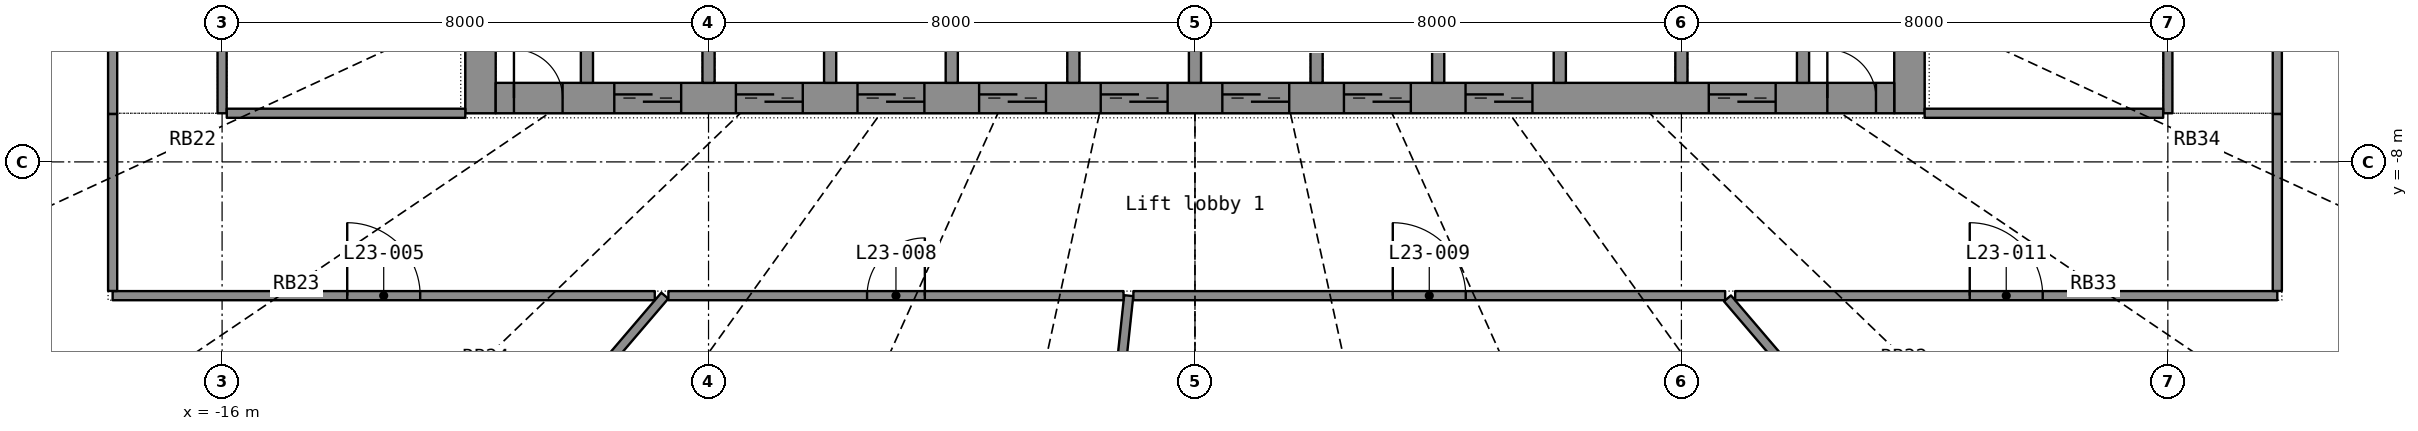
"""IFC4 building model, lengths in metres.
Left out: names, types, materials, properties, quantities, classifications, styles, units other than length and angle.
Written with IfcOpenShell. Run it as: python <this file> out.ifc"""

import sys

from ifc_helpers import new_model, si_unit, direction, frame, frame_2d, origin, place, context, subcontext, project, spatial, rectangle, extrude, element, fill, save


model = new_model("IFC4")
c1 = context("Model", 3, precision=1e-05, world=origin(), true_north=direction((0.0, 1.0)))
c2 = subcontext(c1, "Body", "Model", "MODEL_VIEW")
j1 = project(units=[si_unit("LENGTHUNIT", "METRE"), si_unit("PLANEANGLEUNIT", "RADIAN")], contexts=[c1])
p1 = place(None, origin())
s1 = spatial("IfcSite", under=j1, at=p1, CompositionType="ELEMENT")
p2 = place(p1, origin())
s2 = spatial("IfcBuilding", under=s1, at=p2, CompositionType="ELEMENT")
p3 = place(p2, frame((0.0, 0.0, 100.8)))
s3 = spatial("IfcBuildingStorey", under=s2, at=p3, CompositionType="ELEMENT", Elevation=100.8)
p4 = place(p3, frame((-11.75, -7.2, 0.0), z_axis=(0.0, 0.0, 1.0), x_axis=(0.0, 1.0, 0.0)))
e1 = element("IfcWall", 1, at=p4, inside=s3, PredefinedType="SHEAR", context=c2, shape_type="SweptSolid", body=[
    extrude(rectangle(XDim=14.4, YDim=0.5, at=frame_2d((7.2, 0.0))), origin(), (0.0, 0.0, 1.0), 3.3),
])
p5 = place(p4, frame((6.5, 0.0, 0.0)))
e2 = element("IfcOpeningElement", 2, at=p5, cuts=e1, PredefinedType="OPENING", context=c2, shape_type="SweptSolid", body=[
    extrude(rectangle(XDim=1.4, YDim=2.2, at=frame_2d((0.7, 1.1))), frame((0.0, 0.26, 0.0), z_axis=(0.0, -1.0, 0.0), x_axis=(1.0, 0.0, 0.0)), (0.0, 0.0, 1.0), 0.52),
])
p6 = place(p3, frame((11.75, -7.2, 0.0), z_axis=(0.0, 0.0, 1.0), x_axis=(0.0, 1.0, 0.0)))
e3 = element("IfcWall", 3, at=p6, inside=s3, PredefinedType="SHEAR", context=c2, shape_type="SweptSolid", body=[
    extrude(rectangle(XDim=14.4, YDim=0.5, at=frame_2d((7.2, 0.0))), origin(), (0.0, 0.0, 1.0), 3.3),
])
p7 = place(p6, frame((6.5, 0.0, 0.0)))
e4 = element("IfcOpeningElement", 4, at=p7, cuts=e3, PredefinedType="OPENING", context=c2, shape_type="SweptSolid", body=[
    extrude(rectangle(XDim=1.4, YDim=2.2, at=frame_2d((0.7, 1.1))), frame((0.0, 0.26, 0.0), z_axis=(0.0, -1.0, 0.0), x_axis=(1.0, 0.0, 0.0)), (0.0, 0.0, 1.0), 0.52),
])
p8 = place(p3, frame((-11.5, -6.95, 0.0), z_axis=(0.0, 0.0, 1.0), x_axis=(1.0, 0.0, 0.0)))
e5 = element("IfcWall", 5, at=p8, inside=s3, PredefinedType="SHEAR", context=c2, shape_type="SweptSolid", body=[
    extrude(rectangle(XDim=23.0, YDim=0.5, at=frame_2d((11.5, 0.0))), origin(), (0.0, 0.0, 1.0), 3.3),
])
p9 = place(p8, frame((1.95, 0.0, 0.0)))
e6 = element("IfcOpeningElement", 6, at=p9, cuts=e5, PredefinedType="OPENING", context=c2, shape_type="SweptSolid", body=[
    extrude(rectangle(XDim=1.1, YDim=2.2, at=frame_2d((0.55, 1.1))), frame((0.0, 0.26, 0.0), z_axis=(0.0, -1.0, 0.0), x_axis=(1.0, 0.0, 0.0)), (0.0, 0.0, 1.0), 0.52),
])
p10 = place(p8, frame((3.95, 0.0, 0.0)))
e7 = element("IfcOpeningElement", 7, at=p10, cuts=e5, PredefinedType="OPENING", context=c2, shape_type="SweptSolid", body=[
    extrude(rectangle(XDim=1.1, YDim=2.2, at=frame_2d((0.55, 1.1))), frame((0.0, 0.26, 0.0), z_axis=(0.0, -1.0, 0.0), x_axis=(1.0, 0.0, 0.0)), (0.0, 0.0, 1.0), 0.52),
])
p11 = place(p8, frame((5.95, 0.0, 0.0)))
e8 = element("IfcOpeningElement", 8, at=p11, cuts=e5, PredefinedType="OPENING", context=c2, shape_type="SweptSolid", body=[
    extrude(rectangle(XDim=1.1, YDim=2.2, at=frame_2d((0.55, 1.1))), frame((0.0, 0.26, 0.0), z_axis=(0.0, -1.0, 0.0), x_axis=(1.0, 0.0, 0.0)), (0.0, 0.0, 1.0), 0.52),
])
p12 = place(p8, frame((7.95, 0.0, 0.0)))
e9 = element("IfcOpeningElement", 9, at=p12, cuts=e5, PredefinedType="OPENING", context=c2, shape_type="SweptSolid", body=[
    extrude(rectangle(XDim=1.1, YDim=2.2, at=frame_2d((0.55, 1.1))), frame((0.0, 0.26, 0.0), z_axis=(0.0, -1.0, 0.0), x_axis=(1.0, 0.0, 0.0)), (0.0, 0.0, 1.0), 0.52),
])
p13 = place(p8, frame((9.95, 0.0, 0.0)))
e10 = element("IfcOpeningElement", 10, at=p13, cuts=e5, PredefinedType="OPENING", context=c2, shape_type="SweptSolid", body=[
    extrude(rectangle(XDim=1.1, YDim=2.2, at=frame_2d((0.55, 1.1))), frame((0.0, 0.26, 0.0), z_axis=(0.0, -1.0, 0.0), x_axis=(1.0, 0.0, 0.0)), (0.0, 0.0, 1.0), 0.52),
])
p14 = place(p8, frame((11.95, 0.0, 0.0)))
e11 = element("IfcOpeningElement", 11, at=p14, cuts=e5, PredefinedType="OPENING", context=c2, shape_type="SweptSolid", body=[
    extrude(rectangle(XDim=1.1, YDim=2.2, at=frame_2d((0.55, 1.1))), frame((0.0, 0.26, 0.0), z_axis=(0.0, -1.0, 0.0), x_axis=(1.0, 0.0, 0.0)), (0.0, 0.0, 1.0), 0.52),
])
p15 = place(p8, frame((13.95, 0.0, 0.0)))
e12 = element("IfcOpeningElement", 12, at=p15, cuts=e5, PredefinedType="OPENING", context=c2, shape_type="SweptSolid", body=[
    extrude(rectangle(XDim=1.1, YDim=2.2, at=frame_2d((0.55, 1.1))), frame((0.0, 0.26, 0.0), z_axis=(0.0, -1.0, 0.0), x_axis=(1.0, 0.0, 0.0)), (0.0, 0.0, 1.0), 0.52),
])
p16 = place(p8, frame((15.95, 0.0, 0.0)))
e13 = element("IfcOpeningElement", 13, at=p16, cuts=e5, PredefinedType="OPENING", context=c2, shape_type="SweptSolid", body=[
    extrude(rectangle(XDim=1.1, YDim=2.2, at=frame_2d((0.55, 1.1))), frame((0.0, 0.26, 0.0), z_axis=(0.0, -1.0, 0.0), x_axis=(1.0, 0.0, 0.0)), (0.0, 0.0, 1.0), 0.52),
])
p17 = place(p8, frame((19.95, 0.0, 0.0)))
e14 = element("IfcOpeningElement", 14, at=p17, cuts=e5, PredefinedType="OPENING", context=c2, shape_type="SweptSolid", body=[
    extrude(rectangle(XDim=1.1, YDim=2.2, at=frame_2d((0.55, 1.1))), frame((0.0, 0.26, 0.0), z_axis=(0.0, -1.0, 0.0), x_axis=(1.0, 0.0, 0.0)), (0.0, 0.0, 1.0), 0.52),
])
p18 = place(p8, frame((0.3, 0.0, 0.0)))
e15 = element("IfcOpeningElement", 15, at=p18, cuts=e5, PredefinedType="OPENING", context=c2, shape_type="SweptSolid", body=[
    extrude(rectangle(XDim=0.8, YDim=2.05, at=frame_2d((0.4, 1.025))), frame((0.0, 0.26, 0.0), z_axis=(0.0, -1.0, 0.0), x_axis=(1.0, 0.0, 0.0)), (0.0, 0.0, 1.0), 0.52),
])
p19 = place(p8, frame((21.9, 0.0, 0.0)))
e16 = element("IfcOpeningElement", 16, at=p19, cuts=e5, PredefinedType="OPENING", context=c2, shape_type="SweptSolid", body=[
    extrude(rectangle(XDim=0.8, YDim=2.05, at=frame_2d((0.4, 1.025))), frame((0.0, 0.26, 0.0), z_axis=(0.0, -1.0, 0.0), x_axis=(1.0, 0.0, 0.0)), (0.0, 0.0, 1.0), 0.52),
])
for number, where, z_axis, x_axis in (
    (17, (-10.0, -6.7, 0.0), (0.0, 0.0, 1.0), (0.0, 1.0, 0.0)),
    (18, (-8.0, -6.7, 0.0), (0.0, 0.0, 1.0), (0.0, 1.0, 0.0)),
    (19, (-6.0, -6.7, 0.0), (0.0, 0.0, 1.0), (0.0, 1.0, 0.0)),
    (20, (-4.0, -6.7, 0.0), (0.0, 0.0, 1.0), (0.0, 1.0, 0.0)),
    (21, (-2.0, -6.7, 0.0), (0.0, 0.0, 1.0), (0.0, 1.0, 0.0)),
    (22, (0.0, -6.7, 0.0), (0.0, 0.0, 1.0), (0.0, 1.0, 0.0)),
    (23, (2.0, -6.7, 0.0), (0.0, 0.0, 1.0), (0.0, 1.0, 0.0)),
    (24, (4.0, -6.7, 0.0), (0.0, 0.0, 1.0), (0.0, 1.0, 0.0)),
    (25, (6.0, -6.7, 0.0), (0.0, 0.0, 1.0), (0.0, 1.0, 0.0)),
    (26, (8.0, -6.7, 0.0), (0.0, 0.0, 1.0), (0.0, 1.0, 0.0)),
    (27, (10.0, -6.7, 0.0), (0.0, 0.0, 1.0), (0.0, 1.0, 0.0)),
):
    element("IfcWall", number, at=place(p3, frame(where, z_axis=z_axis, x_axis=x_axis)), inside=s3, PredefinedType="SHEAR", context=c2, shape_type="SweptSolid", body=[
        extrude(rectangle(XDim=2.8, YDim=0.2, at=frame_2d((1.4, 0.0))), origin(), (0.0, 0.0, 1.0), 3.3),
    ])
p20 = place(p3, frame((-2.252, -21.088, 0.0), z_axis=(0.0, 0.0, 1.0), x_axis=(0.106196959, 0.994345114, 0.0)))
e28 = element("IfcWall", 28, at=p20, inside=s3, PredefinedType="PARTITIONING", context=c2, shape_type="SweptSolid", body=[
    extrude(rectangle(XDim=10.95, YDim=0.15, at=frame_2d((5.475, 0.0))), origin(), (0.0, 0.0, 1.0), 2.4),
])
p21 = place(p3, frame((-1.013, -10.2, 0.0), z_axis=(0.0, 0.0, 1.0), x_axis=(1.0, 0.0, 0.0)))
e29 = element("IfcWall", 29, at=p21, inside=s3, PredefinedType="PARTITIONING", context=c2, shape_type="SweptSolid", body=[
    extrude(rectangle(XDim=9.732, YDim=0.15, at=frame_2d((4.866, 0.0))), origin(), (0.0, 0.0, 1.0), 2.4),
])
p22 = place(p21, frame((4.266, 0.0, 0.0)))
e30 = element("IfcOpeningElement", 30, at=p22, cuts=e29, PredefinedType="OPENING", context=c2, shape_type="SweptSolid", body=[
    extrude(rectangle(XDim=1.2, YDim=2.2, at=frame_2d((0.6, 1.1))), frame((0.0, 0.085, 0.0), z_axis=(0.0, -1.0, 0.0), x_axis=(1.0, 0.0, 0.0)), (0.0, 0.0, 1.0), 0.17),
])
p23 = place(p3, frame((14.828, -17.346, 0.0), z_axis=(0.0, 0.0, 1.0), x_axis=(-0.649770677, 0.760130296, 0.0)))
e31 = element("IfcWall", 31, at=p23, inside=s3, PredefinedType="PARTITIONING", context=c2, shape_type="SweptSolid", body=[
    extrude(rectangle(XDim=9.342, YDim=0.15, at=frame_2d((4.671, 0.0))), origin(), (0.0, 0.0, 1.0), 2.4),
])
p24 = place(p3, frame((-14.827, -17.345, 0.0), z_axis=(0.0, 0.0, 1.0), x_axis=(0.649770499, 0.760130448, 0.0)))
e32 = element("IfcWall", 32, at=p24, inside=s3, PredefinedType="PARTITIONING", context=c2, shape_type="SweptSolid", body=[
    extrude(rectangle(XDim=9.4, YDim=0.15, at=frame_2d((4.7, 0.0))), origin(), (0.0, 0.0, 1.0), 2.4),
])
p25 = place(p3, frame((-17.8, -10.2, 0.0), z_axis=(0.0, 0.0, 1.0), x_axis=(1.0, 0.0, 0.0)))
e33 = element("IfcWall", 33, at=p25, inside=s3, PredefinedType="PARTITIONING", context=c2, shape_type="SweptSolid", body=[
    extrude(rectangle(XDim=8.916, YDim=0.15, at=frame_2d((4.458, 0.0))), origin(), (0.0, 0.0, 1.0), 2.4),
])
p26 = place(p25, frame((3.858, 0.0, 0.0)))
e34 = element("IfcOpeningElement", 34, at=p26, cuts=e33, PredefinedType="OPENING", context=c2, shape_type="SweptSolid", body=[
    extrude(rectangle(XDim=1.2, YDim=2.2, at=frame_2d((0.6, 1.1))), frame((0.0, 0.085, 0.0), z_axis=(0.0, -1.0, 0.0), x_axis=(1.0, 0.0, 0.0)), (0.0, 0.0, 1.0), 0.17),
])
p27 = place(p3, frame((8.884, -10.2, 0.0), z_axis=(0.0, 0.0, 1.0), x_axis=(1.0, 0.0, 0.0)))
e35 = element("IfcWall", 35, at=p27, inside=s3, PredefinedType="PARTITIONING", context=c2, shape_type="SweptSolid", body=[
    extrude(rectangle(XDim=8.916, YDim=0.15, at=frame_2d((4.458, 0.0))), origin(), (0.0, 0.0, 1.0), 2.4),
])
p28 = place(p27, frame((3.858, 0.0, 0.0)))
e36 = element("IfcOpeningElement", 36, at=p28, cuts=e35, PredefinedType="OPENING", context=c2, shape_type="SweptSolid", body=[
    extrude(rectangle(XDim=1.2, YDim=2.2, at=frame_2d((0.6, 1.1))), frame((0.0, 0.085, 0.0), z_axis=(0.0, -1.0, 0.0), x_axis=(1.0, 0.0, 0.0)), (0.0, 0.0, 1.0), 0.17),
])
p29 = place(p3, frame((-8.66, -10.2, 0.0), z_axis=(0.0, 0.0, 1.0), x_axis=(1.0, 0.0, 0.0)))
e37 = element("IfcWall", 37, at=p29, inside=s3, PredefinedType="PARTITIONING", context=c2, shape_type="SweptSolid", body=[
    extrude(rectangle(XDim=7.486, YDim=0.15, at=frame_2d((3.743, 0.0))), origin(), (0.0, 0.0, 1.0), 2.4),
])
p30 = place(p29, frame((3.268, 0.0, 0.0)))
e38 = element("IfcOpeningElement", 38, at=p30, cuts=e37, PredefinedType="OPENING", context=c2, shape_type="SweptSolid", body=[
    extrude(rectangle(XDim=0.95, YDim=2.15, at=frame_2d((0.475, 1.075))), frame((0.0, 0.085, 0.0), z_axis=(0.0, -1.0, 0.0), x_axis=(1.0, 0.0, 0.0)), (0.0, 0.0, 1.0), 0.17),
])
p31 = place(p3, frame((-16.0, -7.2, 0.0), z_axis=(0.0, 0.0, 1.0), x_axis=(0.0, 1.0, 0.0)))
e39 = element("IfcWall", 39, at=p31, inside=s3, PredefinedType="PARTITIONING", context=c2, shape_type="SweptSolid", body=[
    extrude(rectangle(XDim=6.053, YDim=0.15, at=frame_2d((3.027, 0.0))), origin(), (0.0, 0.0, 1.0), 2.4),
])
p32 = place(p31, frame((2.427, 0.0, 0.0)))
e40 = element("IfcOpeningElement", 40, at=p32, cuts=e39, PredefinedType="OPENING", context=c2, shape_type="SweptSolid", body=[
    extrude(rectangle(XDim=1.2, YDim=2.2, at=frame_2d((0.6, 1.1))), frame((0.0, 0.085, 0.0), z_axis=(0.0, -1.0, 0.0), x_axis=(1.0, 0.0, 0.0)), (0.0, 0.0, 1.0), 0.17),
])
p33 = place(p3, frame((16.0, -1.146, 0.0), z_axis=(0.0, 0.0, 1.0), x_axis=(0.0, -1.0, 0.0)))
e41 = element("IfcWall", 41, at=p33, inside=s3, PredefinedType="PARTITIONING", context=c2, shape_type="SweptSolid", body=[
    extrude(rectangle(XDim=6.053, YDim=0.15, at=frame_2d((3.027, 0.0))), origin(), (0.0, 0.0, 1.0), 2.4),
])
p34 = place(p33, frame((2.427, 0.0, 0.0)))
e42 = element("IfcOpeningElement", 42, at=p34, cuts=e41, PredefinedType="OPENING", context=c2, shape_type="SweptSolid", body=[
    extrude(rectangle(XDim=1.2, YDim=2.2, at=frame_2d((0.6, 1.1))), frame((0.0, 0.085, 0.0), z_axis=(0.0, -1.0, 0.0), x_axis=(1.0, 0.0, 0.0)), (0.0, 0.0, 1.0), 0.17),
])
p35 = place(p3, frame((-17.8, -1.276, 0.0), z_axis=(0.0, 0.0, 1.0), x_axis=(0.0, -1.0, 0.0)))
e43 = element("IfcWall", 43, at=p35, inside=s3, PredefinedType="PARTITIONING", context=c2, shape_type="SweptSolid", body=[
    extrude(rectangle(XDim=5.936, YDim=0.15, at=frame_2d((2.968, 0.0))), origin(), (0.0, 0.0, 1.0), 2.4),
])
p36 = place(p35, frame((2.368, 0.0, 0.0)))
e44 = element("IfcOpeningElement", 44, at=p36, cuts=e43, PredefinedType="OPENING", context=c2, shape_type="SweptSolid", body=[
    extrude(rectangle(XDim=1.2, YDim=2.2, at=frame_2d((0.6, 1.1))), frame((0.0, 0.085, 0.0), z_axis=(0.0, -1.0, 0.0), x_axis=(1.0, 0.0, 0.0)), (0.0, 0.0, 1.0), 0.17),
])
p37 = place(p3, frame((17.8, -7.212, 0.0), z_axis=(0.0, 0.0, 1.0), x_axis=(0.0, 1.0, 0.0)))
e45 = element("IfcWall", 45, at=p37, inside=s3, PredefinedType="PARTITIONING", context=c2, shape_type="SweptSolid", body=[
    extrude(rectangle(XDim=5.789, YDim=0.15, at=frame_2d((2.894, 0.0))), origin(), (0.0, 0.0, 1.0), 2.4),
])
p38 = place(p37, frame((2.294, 0.0, 0.0)))
e46 = element("IfcOpeningElement", 46, at=p38, cuts=e45, PredefinedType="OPENING", context=c2, shape_type="SweptSolid", body=[
    extrude(rectangle(XDim=1.2, YDim=2.2, at=frame_2d((0.6, 1.1))), frame((0.0, 0.085, 0.0), z_axis=(0.0, -1.0, 0.0), x_axis=(1.0, 0.0, 0.0)), (0.0, 0.0, 1.0), 0.17),
])
for number, where, z_axis, x_axis in (
    (47, (-12.0, -7.2, 0.0), (0.0, 0.0, 1.0), (-1.0, 0.0, 0.0)),
    (48, (15.923, -7.2, 0.0), (0.0, 0.0, 1.0), (-1.0, 0.0, 0.0)),
):
    element("IfcWall", number, at=place(p3, frame(where, z_axis=z_axis, x_axis=x_axis)), inside=s3, PredefinedType="PARTITIONING", context=c2, shape_type="SweptSolid", body=[
        extrude(rectangle(XDim=3.923, YDim=0.15, at=frame_2d((1.961, 0.0))), origin(), (0.0, 0.0, 1.0), 2.4),
    ])
for number, where, z_axis, x_axis in (
    (49, (-17.8, -7.213, 0.0), (0.0, 0.0, 1.0), (0.0, -1.0, 0.0)),
    (50, (17.8, -10.123, 0.0), (0.0, 0.0, 1.0), (0.0, 1.0, 0.0)),
):
    element("IfcWall", number, at=place(p3, frame(where, z_axis=z_axis, x_axis=x_axis)), inside=s3, PredefinedType="PARTITIONING", context=c2, shape_type="SweptSolid", body=[
        extrude(rectangle(XDim=2.91, YDim=0.15, at=frame_2d((1.455, 0.0))), origin(), (0.0, 0.0, 1.0), 2.4),
    ])
p39 = place(p9, origin())
e51 = element("IfcDoor", 51, at=p39, inside=s3, OperationType="DOUBLE_DOOR_SLIDING", PredefinedType="DOOR", context=c2, shape_type="SweptSolid", body=[
    extrude(rectangle(XDim=1.1, YDim=2.2, at=frame_2d((0.55, 1.1))), frame((0.0, 0.025, 0.0), z_axis=(0.0, -1.0, 0.0), x_axis=(1.0, 0.0, 0.0)), (0.0, 0.0, 1.0), 0.05),
])
fill(e6, e51)
p40 = place(p10, origin())
e52 = element("IfcDoor", 52, at=p40, inside=s3, OperationType="DOUBLE_DOOR_SLIDING", PredefinedType="DOOR", context=c2, shape_type="SweptSolid", body=[
    extrude(rectangle(XDim=1.1, YDim=2.2, at=frame_2d((0.55, 1.1))), frame((0.0, 0.025, 0.0), z_axis=(0.0, -1.0, 0.0), x_axis=(1.0, 0.0, 0.0)), (0.0, 0.0, 1.0), 0.05),
])
fill(e7, e52)
p41 = place(p11, origin())
e53 = element("IfcDoor", 53, at=p41, inside=s3, OperationType="DOUBLE_DOOR_SLIDING", PredefinedType="DOOR", context=c2, shape_type="SweptSolid", body=[
    extrude(rectangle(XDim=1.1, YDim=2.2, at=frame_2d((0.55, 1.1))), frame((0.0, 0.025, 0.0), z_axis=(0.0, -1.0, 0.0), x_axis=(1.0, 0.0, 0.0)), (0.0, 0.0, 1.0), 0.05),
])
fill(e8, e53)
p42 = place(p12, origin())
e54 = element("IfcDoor", 54, at=p42, inside=s3, OperationType="DOUBLE_DOOR_SLIDING", PredefinedType="DOOR", context=c2, shape_type="SweptSolid", body=[
    extrude(rectangle(XDim=1.1, YDim=2.2, at=frame_2d((0.55, 1.1))), frame((0.0, 0.025, 0.0), z_axis=(0.0, -1.0, 0.0), x_axis=(1.0, 0.0, 0.0)), (0.0, 0.0, 1.0), 0.05),
])
fill(e9, e54)
p43 = place(p13, origin())
e55 = element("IfcDoor", 55, at=p43, inside=s3, OperationType="DOUBLE_DOOR_SLIDING", PredefinedType="DOOR", context=c2, shape_type="SweptSolid", body=[
    extrude(rectangle(XDim=1.1, YDim=2.2, at=frame_2d((0.55, 1.1))), frame((0.0, 0.025, 0.0), z_axis=(0.0, -1.0, 0.0), x_axis=(1.0, 0.0, 0.0)), (0.0, 0.0, 1.0), 0.05),
])
fill(e10, e55)
p44 = place(p14, origin())
e56 = element("IfcDoor", 56, at=p44, inside=s3, OperationType="DOUBLE_DOOR_SLIDING", PredefinedType="DOOR", context=c2, shape_type="SweptSolid", body=[
    extrude(rectangle(XDim=1.1, YDim=2.2, at=frame_2d((0.55, 1.1))), frame((0.0, 0.025, 0.0), z_axis=(0.0, -1.0, 0.0), x_axis=(1.0, 0.0, 0.0)), (0.0, 0.0, 1.0), 0.05),
])
fill(e11, e56)
p45 = place(p15, origin())
e57 = element("IfcDoor", 57, at=p45, inside=s3, OperationType="DOUBLE_DOOR_SLIDING", PredefinedType="DOOR", context=c2, shape_type="SweptSolid", body=[
    extrude(rectangle(XDim=1.1, YDim=2.2, at=frame_2d((0.55, 1.1))), frame((0.0, 0.025, 0.0), z_axis=(0.0, -1.0, 0.0), x_axis=(1.0, 0.0, 0.0)), (0.0, 0.0, 1.0), 0.05),
])
fill(e12, e57)
p46 = place(p16, origin())
e58 = element("IfcDoor", 58, at=p46, inside=s3, OperationType="DOUBLE_DOOR_SLIDING", PredefinedType="DOOR", context=c2, shape_type="SweptSolid", body=[
    extrude(rectangle(XDim=1.1, YDim=2.2, at=frame_2d((0.55, 1.1))), frame((0.0, 0.025, 0.0), z_axis=(0.0, -1.0, 0.0), x_axis=(1.0, 0.0, 0.0)), (0.0, 0.0, 1.0), 0.05),
])
fill(e13, e58)
p47 = place(p17, origin())
e59 = element("IfcDoor", 59, at=p47, inside=s3, OperationType="DOUBLE_DOOR_SLIDING", PredefinedType="DOOR", context=c2, shape_type="SweptSolid", body=[
    extrude(rectangle(XDim=1.1, YDim=2.2, at=frame_2d((0.55, 1.1))), frame((0.0, 0.025, 0.0), z_axis=(0.0, -1.0, 0.0), x_axis=(1.0, 0.0, 0.0)), (0.0, 0.0, 1.0), 0.05),
])
fill(e14, e59)
p48 = place(p18, origin())
e60 = element("IfcDoor", 60, at=p48, inside=s3, OperationType="SINGLE_SWING_LEFT", PredefinedType="DOOR", context=c2, shape_type="SweptSolid", body=[
    extrude(rectangle(XDim=0.8, YDim=2.05, at=frame_2d((0.4, 1.025))), frame((0.0, 0.025, 0.0), z_axis=(0.0, -1.0, 0.0), x_axis=(1.0, 0.0, 0.0)), (0.0, 0.0, 1.0), 0.05),
])
fill(e15, e60)
p49 = place(p19, origin())
e61 = element("IfcDoor", 61, at=p49, inside=s3, OperationType="SINGLE_SWING_LEFT", PredefinedType="DOOR", context=c2, shape_type="SweptSolid", body=[
    extrude(rectangle(XDim=0.8, YDim=2.05, at=frame_2d((0.4, 1.025))), frame((0.0, 0.025, 0.0), z_axis=(0.0, -1.0, 0.0), x_axis=(1.0, 0.0, 0.0)), (0.0, 0.0, 1.0), 0.05),
])
fill(e16, e61)
p50 = place(p26, origin())
e62 = element("IfcDoor", 62, at=p50, inside=s3, OperationType="DOUBLE_DOOR_SINGLE_SWING", PredefinedType="DOOR", context=c2, shape_type="SweptSolid", body=[
    extrude(rectangle(XDim=1.2, YDim=2.2, at=frame_2d((0.6, 1.1))), frame((0.0, 0.025, 0.0), z_axis=(0.0, -1.0, 0.0), x_axis=(1.0, 0.0, 0.0)), (0.0, 0.0, 1.0), 0.05),
])
fill(e34, e62)
p51 = place(p30, origin())
e63 = element("IfcDoor", 63, at=p51, inside=s3, OperationType="SINGLE_SWING_RIGHT", PredefinedType="DOOR", context=c2, shape_type="SweptSolid", body=[
    extrude(rectangle(XDim=0.95, YDim=2.15, at=frame_2d((0.475, 1.075))), frame((0.0, 0.025, 0.0), z_axis=(0.0, -1.0, 0.0), x_axis=(1.0, 0.0, 0.0)), (0.0, 0.0, 1.0), 0.05),
])
fill(e38, e63)
p52 = place(p22, origin())
e64 = element("IfcDoor", 64, at=p52, inside=s3, OperationType="DOUBLE_DOOR_SINGLE_SWING", PredefinedType="DOOR", context=c2, shape_type="SweptSolid", body=[
    extrude(rectangle(XDim=1.2, YDim=2.2, at=frame_2d((0.6, 1.1))), frame((0.0, 0.025, 0.0), z_axis=(0.0, -1.0, 0.0), x_axis=(1.0, 0.0, 0.0)), (0.0, 0.0, 1.0), 0.05),
])
fill(e30, e64)
p53 = place(p28, origin())
e65 = element("IfcDoor", 65, at=p53, inside=s3, OperationType="DOUBLE_DOOR_SINGLE_SWING", PredefinedType="DOOR", context=c2, shape_type="SweptSolid", body=[
    extrude(rectangle(XDim=1.2, YDim=2.2, at=frame_2d((0.6, 1.1))), frame((0.0, 0.025, 0.0), z_axis=(0.0, -1.0, 0.0), x_axis=(1.0, 0.0, 0.0)), (0.0, 0.0, 1.0), 0.05),
])
fill(e36, e65)
save(model, sys.argv[1])
